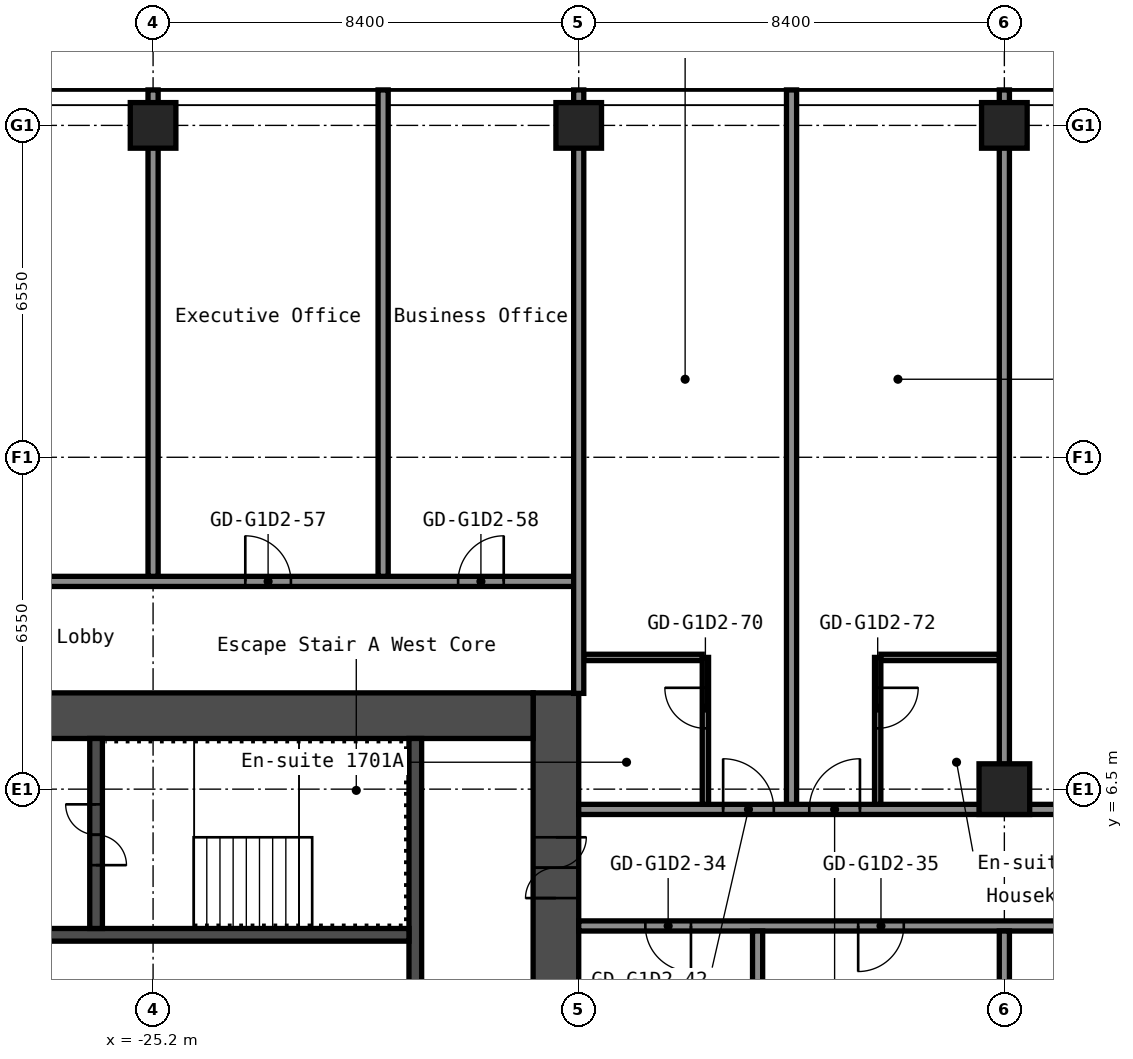
"""IFC4 building model, lengths in metres.
Left out: names, types, materials, properties, quantities, classifications, styles, units other than length and angle.
Written with IfcOpenShell. Run it as: python <this file> out.ifc"""

import sys

from ifc_helpers import new_model, si_unit, direction, frame, frame_2d, origin, origin_2d, place, context, subcontext, project, spatial, rectangle, hollow_rectangle, extrude, element, fill, save


model = new_model("IFC4")
c1 = context("Model", 3, precision=1e-05, world=origin(), true_north=direction((0.0, 1.0)))
c2 = subcontext(c1, "Body", "Model", "MODEL_VIEW")
j1 = project(units=[si_unit("LENGTHUNIT", "METRE"), si_unit("PLANEANGLEUNIT", "RADIAN")], contexts=[c1])
p1 = place(None, origin())
s1 = spatial("IfcSite", under=j1, at=p1, CompositionType="ELEMENT")
p2 = place(p1, origin())
s2 = spatial("IfcBuilding", under=s1, at=p2, CompositionType="ELEMENT")
p3 = place(p2, frame((0.0, 0.0, 61.4)))
s3 = spatial("IfcBuildingStorey", under=s2, at=p3, CompositionType="ELEMENT", Elevation=61.4)
for number, where, z_axis, x_axis in (
    (1, (-25.2, 19.6, 0.0), (0.0, 0.0, 1.0), (1.0, 0.0, 0.0)),
    (2, (-16.8, 19.6, 0.0), (0.0, 0.0, 1.0), (1.0, 0.0, 0.0)),
):
    element("IfcColumn", number, at=place(p3, frame(where, z_axis=z_axis, x_axis=x_axis)), inside=s3, PredefinedType="COLUMN", context=c2, shape_type="SweptSolid", body=[
        extrude(hollow_rectangle(XDim=0.9, YDim=0.9, WallThickness=0.036, at=origin_2d()), origin(), (0.0, 0.0, 1.0), 2.9),
    ])
p4 = place(p3, frame((-8.4, 6.5, 0.0), z_axis=(0.0, 0.0, 1.0), x_axis=(1.0, 0.0, 0.0)))
e3 = element("IfcColumn", 3, at=p4, inside=s3, PredefinedType="COLUMN", context=c2, shape_type="SweptSolid", body=[
    extrude(hollow_rectangle(XDim=1.0, YDim=1.0, WallThickness=0.04, at=origin_2d()), origin(), (0.0, 0.0, 1.0), 2.9),
])
p5 = place(p3, frame((-8.4, 19.6, 0.0), z_axis=(0.0, 0.0, 1.0), x_axis=(1.0, 0.0, 0.0)))
e4 = element("IfcColumn", 4, at=p5, inside=s3, PredefinedType="COLUMN", context=c2, shape_type="SweptSolid", body=[
    extrude(hollow_rectangle(XDim=0.9, YDim=0.9, WallThickness=0.036, at=origin_2d()), origin(), (0.0, 0.0, 1.0), 2.9),
])
p6 = place(p3, frame((-17.25, -8.4, 0.0), z_axis=(0.0, 0.0, 1.0), x_axis=(0.0, 1.0, 0.0)))
e5 = element("IfcWall", 5, at=p6, inside=s3, PredefinedType="SHEAR", context=c2, shape_type="SweptSolid", body=[
    extrude(rectangle(XDim=16.8, YDim=0.9, at=frame_2d((8.4, 0.0))), origin(), (0.0, 0.0, 1.0), 2.9),
])
p7 = place(p6, frame((12.75, 0.0, 0.0)))
e6 = element("IfcOpeningElement", 6, at=p7, cuts=e5, PredefinedType="OPENING", context=c2, shape_type="SweptSolid", body=[
    extrude(rectangle(XDim=1.2, YDim=2.1, at=frame_2d((0.6, 1.05))), frame((0.0, 0.46, 0.0), z_axis=(0.0, -1.0, 0.0), x_axis=(1.0, 0.0, 0.0)), (0.0, 0.0, 1.0), 0.92),
])
p8 = place(p6, frame((2.85, 0.0, 0.0)))
e7 = element("IfcOpeningElement", 7, at=p8, cuts=e5, PredefinedType="OPENING", context=c2, shape_type="SweptSolid", body=[
    extrude(rectangle(XDim=1.2, YDim=2.1, at=frame_2d((0.6, 1.05))), frame((0.0, 0.46, 0.0), z_axis=(0.0, -1.0, 0.0), x_axis=(1.0, 0.0, 0.0)), (0.0, 0.0, 1.0), 0.92),
])
p9 = place(p3, frame((-32.7, 7.95, 0.0), z_axis=(0.0, 0.0, 1.0), x_axis=(1.0, 0.0, 0.0)))
e8 = element("IfcWall", 8, at=p9, inside=s3, PredefinedType="SHEAR", context=c2, shape_type="SweptSolid", body=[
    extrude(rectangle(XDim=15.0, YDim=0.9, at=frame_2d((7.5, 0.0))), origin(), (0.0, 0.0, 1.0), 2.9),
])
p10 = place(p9, frame((3.4, 0.0, 0.0)))
e9 = element("IfcOpeningElement", 9, at=p10, cuts=e8, PredefinedType="OPENING", context=c2, shape_type="SweptSolid", body=[
    extrude(rectangle(XDim=1.2, YDim=2.1, at=frame_2d((0.6, 1.05))), frame((0.0, 0.46, 0.0), z_axis=(0.0, -1.0, 0.0), x_axis=(1.0, 0.0, 0.0)), (0.0, 0.0, 1.0), 0.92),
])
p11 = place(p9, frame((0.75, 0.0, 0.0)))
e10 = element("IfcOpeningElement", 10, at=p11, cuts=e8, PredefinedType="OPENING", context=c2, shape_type="SweptSolid", body=[
    extrude(rectangle(XDim=0.9, YDim=2.1, at=frame_2d((0.45, 1.05))), frame((0.0, 0.46, 0.0), z_axis=(0.0, -1.0, 0.0), x_axis=(1.0, 0.0, 0.0)), (0.0, 0.0, 1.0), 0.92),
])
p12 = place(p3, frame((-20.025, 1.2, 0.0), z_axis=(0.0, 0.0, 1.0), x_axis=(0.0, 1.0, 0.0)))
e11 = element("IfcWall", 11, at=p12, inside=s3, PredefinedType="SHEAR", context=c2, shape_type="SweptSolid", body=[
    extrude(rectangle(XDim=6.3, YDim=0.25, at=frame_2d((3.15, 0.0))), origin(), (0.0, 0.0, 1.0), 2.9),
])
p13 = place(p3, frame((-27.65, 3.625, 0.0), z_axis=(0.0, 0.0, 1.0), x_axis=(1.0, 0.0, 0.0)))
e12 = element("IfcWall", 12, at=p13, inside=s3, PredefinedType="SHEAR", context=c2, shape_type="SweptSolid", body=[
    extrude(rectangle(XDim=7.5, YDim=0.25, at=frame_2d((3.75, 0.0))), origin(), (0.0, 0.0, 1.0), 2.9),
])
p14 = place(p3, frame((-26.325, 3.75, 0.0), z_axis=(0.0, 0.0, 1.0), x_axis=(0.0, 1.0, 0.0)))
e13 = element("IfcWall", 13, at=p14, inside=s3, PredefinedType="SHEAR", context=c2, shape_type="SweptSolid", body=[
    extrude(rectangle(XDim=3.75, YDim=0.25, at=frame_2d((1.875, 0.0))), origin(), (0.0, 0.0, 1.0), 2.9),
])
p15 = place(p14, frame((1.25, 0.0, 0.0)))
e14 = element("IfcOpeningElement", 14, at=p15, cuts=e13, PredefinedType="OPENING", context=c2, shape_type="SweptSolid", body=[
    extrude(rectangle(XDim=1.2, YDim=2.1, at=frame_2d((0.6, 1.05))), frame((0.0, 0.135, 0.0), z_axis=(0.0, -1.0, 0.0), x_axis=(1.0, 0.0, 0.0)), (0.0, 0.0, 1.0), 0.27),
])
p16 = place(p3, frame((-16.8, 3.8, 0.0), z_axis=(0.0, 0.0, 1.0), x_axis=(1.0, 0.0, 0.0)))
e15 = element("IfcWall", 15, at=p16, inside=s3, PredefinedType="PARTITIONING", context=c2, shape_type="SweptSolid", body=[
    extrude(rectangle(XDim=33.6, YDim=0.2, at=frame_2d((16.8, 0.0))), origin(), (0.0, 0.0, 1.0), 2.9),
])
p17 = place(p16, frame((1.315, 0.0, 0.0)))
e16 = element("IfcOpeningElement", 16, at=p17, cuts=e15, PredefinedType="OPENING", context=c2, shape_type="SweptSolid", body=[
    extrude(rectangle(XDim=0.9, YDim=2.1, at=frame_2d((0.45, 1.05))), frame((0.0, 0.11, 0.0), z_axis=(0.0, -1.0, 0.0), x_axis=(1.0, 0.0, 0.0)), (0.0, 0.0, 1.0), 0.22),
])
p18 = place(p16, frame((5.515, 0.0, 0.0)))
e17 = element("IfcOpeningElement", 17, at=p18, cuts=e15, PredefinedType="OPENING", context=c2, shape_type="SweptSolid", body=[
    extrude(rectangle(XDim=0.9, YDim=2.1, at=frame_2d((0.45, 1.05))), frame((0.0, 0.11, 0.0), z_axis=(0.0, -1.0, 0.0), x_axis=(1.0, 0.0, 0.0)), (0.0, 0.0, 1.0), 0.22),
])
p19 = place(p16, frame((18.03, 0.0, 0.0)))
e18 = element("IfcOpeningElement", 18, at=p19, cuts=e15, PredefinedType="OPENING", context=c2, shape_type="SweptSolid", body=[
    extrude(rectangle(XDim=0.9, YDim=2.1, at=frame_2d((0.45, 1.05))), frame((0.0, 0.11, 0.0), z_axis=(0.0, -1.0, 0.0), x_axis=(1.0, 0.0, 0.0)), (0.0, 0.0, 1.0), 0.22),
])
p20 = place(p16, frame((22.23, 0.0, 0.0)))
e19 = element("IfcOpeningElement", 19, at=p20, cuts=e15, PredefinedType="OPENING", context=c2, shape_type="SweptSolid", body=[
    extrude(rectangle(XDim=0.9, YDim=2.1, at=frame_2d((0.45, 1.05))), frame((0.0, 0.11, 0.0), z_axis=(0.0, -1.0, 0.0), x_axis=(1.0, 0.0, 0.0)), (0.0, 0.0, 1.0), 0.22),
])
p21 = place(p3, frame((-16.8, 6.1, 0.0), z_axis=(0.0, 0.0, 1.0), x_axis=(1.0, 0.0, 0.0)))
e20 = element("IfcWall", 20, at=p21, inside=s3, PredefinedType="PARTITIONING", context=c2, shape_type="SweptSolid", body=[
    extrude(rectangle(XDim=33.6, YDim=0.2, at=frame_2d((16.8, 0.0))), origin(), (0.0, 0.0, 1.0), 2.9),
])
p22 = place(p21, frame((2.85, 0.0, 0.0)))
e21 = element("IfcOpeningElement", 21, at=p22, cuts=e20, PredefinedType="OPENING", context=c2, shape_type="SweptSolid", body=[
    extrude(rectangle(XDim=1.0, YDim=2.1, at=frame_2d((0.5, 1.05))), frame((0.0, 0.11, 0.0), z_axis=(0.0, -1.0, 0.0), x_axis=(1.0, 0.0, 0.0)), (0.0, 0.0, 1.0), 0.22),
])
p23 = place(p21, frame((4.55, 0.0, 0.0)))
e22 = element("IfcOpeningElement", 22, at=p23, cuts=e20, PredefinedType="OPENING", context=c2, shape_type="SweptSolid", body=[
    extrude(rectangle(XDim=1.0, YDim=2.1, at=frame_2d((0.5, 1.05))), frame((0.0, 0.11, 0.0), z_axis=(0.0, -1.0, 0.0), x_axis=(1.0, 0.0, 0.0)), (0.0, 0.0, 1.0), 0.22),
])
p24 = place(p21, frame((10.4, 0.0, 0.0)))
e23 = element("IfcOpeningElement", 23, at=p24, cuts=e20, PredefinedType="OPENING", context=c2, shape_type="SweptSolid", body=[
    extrude(rectangle(XDim=1.0, YDim=2.1, at=frame_2d((0.5, 1.05))), frame((0.0, 0.11, 0.0), z_axis=(0.0, -1.0, 0.0), x_axis=(1.0, 0.0, 0.0)), (0.0, 0.0, 1.0), 0.22),
])
p25 = place(p21, frame((22.3, 0.0, 0.0)))
e24 = element("IfcOpeningElement", 24, at=p25, cuts=e20, PredefinedType="OPENING", context=c2, shape_type="SweptSolid", body=[
    extrude(rectangle(XDim=1.0, YDim=2.1, at=frame_2d((0.5, 1.05))), frame((0.0, 0.11, 0.0), z_axis=(0.0, -1.0, 0.0), x_axis=(1.0, 0.0, 0.0)), (0.0, 0.0, 1.0), 0.22),
])
p26 = place(p21, frame((30.6, 0.0, 0.0)))
e25 = element("IfcOpeningElement", 25, at=p26, cuts=e20, PredefinedType="OPENING", context=c2, shape_type="SweptSolid", body=[
    extrude(rectangle(XDim=1.0, YDim=2.1, at=frame_2d((0.5, 1.05))), frame((0.0, 0.11, 0.0), z_axis=(0.0, -1.0, 0.0), x_axis=(1.0, 0.0, 0.0)), (0.0, 0.0, 1.0), 0.22),
])
for number, where, z_axis, x_axis in (
    (26, (-16.7, 9.1, 0.0), (0.0, 0.0, 1.0), (1.0, 0.0, 0.0)),
    (27, (-10.837, 9.1, 0.0), (0.0, 0.0, 1.0), (1.0, 0.0, 0.0)),
):
    element("IfcWall", number, at=place(p3, frame(where, z_axis=z_axis, x_axis=x_axis)), inside=s3, PredefinedType="PARTITIONING", context=c2, shape_type="SweptSolid", body=[
        extrude(rectangle(XDim=2.337, YDim=0.125, at=frame_2d((1.169, 0.0))), origin(), (0.0, 0.0, 1.0), 2.9),
    ])
p27 = place(p3, frame((-51.1, 10.6, 0.0), z_axis=(0.0, 0.0, 1.0), x_axis=(1.0, 0.0, 0.0)))
e28 = element("IfcWall", 28, at=p27, inside=s3, PredefinedType="PARTITIONING", context=c2, shape_type="SweptSolid", body=[
    extrude(rectangle(XDim=34.3, YDim=0.2, at=frame_2d((17.15, 0.0))), origin(), (0.0, 0.0, 1.0), 2.9),
])
p28 = place(p27, frame((4.2, 0.0, 0.0)))
e29 = element("IfcOpeningElement", 29, at=p28, cuts=e28, PredefinedType="OPENING", context=c2, shape_type="SweptSolid", body=[
    extrude(rectangle(XDim=1.0, YDim=2.1, at=frame_2d((0.5, 1.05))), frame((0.0, 0.11, 0.0), z_axis=(0.0, -1.0, 0.0), x_axis=(1.0, 0.0, 0.0)), (0.0, 0.0, 1.0), 0.22),
])
p29 = place(p27, frame((10.16, 0.0, 0.0)))
e30 = element("IfcOpeningElement", 30, at=p29, cuts=e28, PredefinedType="OPENING", context=c2, shape_type="SweptSolid", body=[
    extrude(rectangle(XDim=0.9, YDim=2.1, at=frame_2d((0.45, 1.05))), frame((0.0, 0.11, 0.0), z_axis=(0.0, -1.0, 0.0), x_axis=(1.0, 0.0, 0.0)), (0.0, 0.0, 1.0), 0.22),
])
p30 = place(p27, frame((14.36, 0.0, 0.0)))
e31 = element("IfcOpeningElement", 31, at=p30, cuts=e28, PredefinedType="OPENING", context=c2, shape_type="SweptSolid", body=[
    extrude(rectangle(XDim=0.9, YDim=2.1, at=frame_2d((0.45, 1.05))), frame((0.0, 0.11, 0.0), z_axis=(0.0, -1.0, 0.0), x_axis=(1.0, 0.0, 0.0)), (0.0, 0.0, 1.0), 0.22),
])
p31 = place(p27, frame((21.2, 0.0, 0.0)))
e32 = element("IfcOpeningElement", 32, at=p31, cuts=e28, PredefinedType="OPENING", context=c2, shape_type="SweptSolid", body=[
    extrude(rectangle(XDim=1.0, YDim=2.1, at=frame_2d((0.5, 1.05))), frame((0.0, 0.11, 0.0), z_axis=(0.0, -1.0, 0.0), x_axis=(1.0, 0.0, 0.0)), (0.0, 0.0, 1.0), 0.22),
])
p32 = place(p27, frame((27.72, 0.0, 0.0)))
e33 = element("IfcOpeningElement", 33, at=p32, cuts=e28, PredefinedType="OPENING", context=c2, shape_type="SweptSolid", body=[
    extrude(rectangle(XDim=0.9, YDim=2.1, at=frame_2d((0.45, 1.05))), frame((0.0, 0.11, 0.0), z_axis=(0.0, -1.0, 0.0), x_axis=(1.0, 0.0, 0.0)), (0.0, 0.0, 1.0), 0.22),
])
p33 = place(p27, frame((31.92, 0.0, 0.0)))
e34 = element("IfcOpeningElement", 34, at=p33, cuts=e28, PredefinedType="OPENING", context=c2, shape_type="SweptSolid", body=[
    extrude(rectangle(XDim=0.9, YDim=2.1, at=frame_2d((0.45, 1.05))), frame((0.0, 0.11, 0.0), z_axis=(0.0, -1.0, 0.0), x_axis=(1.0, 0.0, 0.0)), (0.0, 0.0, 1.0), 0.22),
])
for number, where, z_axis, x_axis in (
    (35, (-25.2, 10.7, 0.0), (0.0, 0.0, 1.0), (0.0, 1.0, 0.0)),
    (36, (-20.66, 10.7, 0.0), (0.0, 0.0, 1.0), (0.0, 1.0, 0.0)),
):
    element("IfcWall", number, at=place(p3, frame(where, z_axis=z_axis, x_axis=x_axis)), inside=s3, PredefinedType="PARTITIONING", context=c2, shape_type="SweptSolid", body=[
        extrude(rectangle(XDim=9.6, YDim=0.2, at=frame_2d((4.8, 0.0))), origin(), (0.0, 0.0, 1.0), 2.9),
    ])
p34 = place(p3, frame((-16.8, 8.39, 0.0), z_axis=(0.0, 0.0, 1.0), x_axis=(0.0, 1.0, 0.0)))
e37 = element("IfcWall", 37, at=p34, inside=s3, PredefinedType="PARTITIONING", context=c2, shape_type="SweptSolid", body=[
    extrude(rectangle(XDim=11.91, YDim=0.2, at=frame_2d((5.955, 0.0))), origin(), (0.0, 0.0, 1.0), 2.9),
])
p35 = place(p3, frame((-14.3, 6.2, 0.0), z_axis=(0.0, 0.0, 1.0), x_axis=(0.0, 1.0, 0.0)))
e38 = element("IfcWall", 38, at=p35, inside=s3, PredefinedType="PARTITIONING", context=c2, shape_type="SweptSolid", body=[
    extrude(rectangle(XDim=2.9, YDim=0.125, at=frame_2d((1.45, 0.0))), origin(), (0.0, 0.0, 1.0), 2.9),
])
p36 = place(p35, frame((1.5, 0.0, 0.0)))
e39 = element("IfcOpeningElement", 39, at=p36, cuts=e38, PredefinedType="OPENING", context=c2, shape_type="SweptSolid", body=[
    extrude(rectangle(XDim=0.8, YDim=2.1, at=frame_2d((0.4, 1.05))), frame((0.0, 0.073, 0.0), z_axis=(0.0, -1.0, 0.0), x_axis=(1.0, 0.0, 0.0)), (0.0, 0.0, 1.0), 0.145),
])
p37 = place(p3, frame((-13.27, -3.7, 0.0), z_axis=(0.0, 0.0, 1.0), x_axis=(0.0, 1.0, 0.0)))
e40 = element("IfcWall", 40, at=p37, inside=s3, PredefinedType="PARTITIONING", context=c2, shape_type="SweptSolid", body=[
    extrude(rectangle(XDim=7.4, YDim=0.2, at=frame_2d((3.7, 0.0))), origin(), (0.0, 0.0, 1.0), 2.9),
])
p38 = place(p3, frame((-12.6, 6.2, 0.0), z_axis=(0.0, 0.0, 1.0), x_axis=(0.0, 1.0, 0.0)))
e41 = element("IfcWall", 41, at=p38, inside=s3, PredefinedType="PARTITIONING", context=c2, shape_type="SweptSolid", body=[
    extrude(rectangle(XDim=14.1, YDim=0.2, at=frame_2d((7.05, 0.0))), origin(), (0.0, 0.0, 1.0), 2.9),
])
p39 = place(p3, frame((-10.9, 6.2, 0.0), z_axis=(0.0, 0.0, 1.0), x_axis=(0.0, 1.0, 0.0)))
e42 = element("IfcWall", 42, at=p39, inside=s3, PredefinedType="PARTITIONING", context=c2, shape_type="SweptSolid", body=[
    extrude(rectangle(XDim=2.9, YDim=0.125, at=frame_2d((1.45, 0.0))), origin(), (0.0, 0.0, 1.0), 2.9),
])
p40 = place(p39, frame((1.5, 0.0, 0.0)))
e43 = element("IfcOpeningElement", 43, at=p40, cuts=e42, PredefinedType="OPENING", context=c2, shape_type="SweptSolid", body=[
    extrude(rectangle(XDim=0.8, YDim=2.1, at=frame_2d((0.4, 1.05))), frame((0.0, 0.073, 0.0), z_axis=(0.0, -1.0, 0.0), x_axis=(1.0, 0.0, 0.0)), (0.0, 0.0, 1.0), 0.145),
])
p41 = place(p3, frame((-8.4, -3.7, 0.0), z_axis=(0.0, 0.0, 1.0), x_axis=(0.0, 1.0, 0.0)))
e44 = element("IfcWall", 44, at=p41, inside=s3, PredefinedType="PARTITIONING", context=c2, shape_type="SweptSolid", body=[
    extrude(rectangle(XDim=7.4, YDim=0.2, at=frame_2d((3.7, 0.0))), origin(), (0.0, 0.0, 1.0), 2.9),
])
p42 = place(p3, frame((-8.4, 6.99, 0.0), z_axis=(0.0, 0.0, 1.0), x_axis=(0.0, 1.0, 0.0)))
e45 = element("IfcWall", 45, at=p42, inside=s3, PredefinedType="PARTITIONING", context=c2, shape_type="SweptSolid", body=[
    extrude(rectangle(XDim=13.31, YDim=0.2, at=frame_2d((6.655, 0.0))), origin(), (0.0, 0.0, 1.0), 2.9),
])
p43 = place(p7, origin())
e46 = element("IfcDoor", 46, at=p43, inside=s3, OperationType="DOUBLE_DOOR_SINGLE_SWING", PredefinedType="DOOR", context=c2, shape_type="SweptSolid", body=[
    extrude(rectangle(XDim=1.2, YDim=2.1, at=frame_2d((0.6, 1.05))), frame((0.0, 0.025, 0.0), z_axis=(0.0, -1.0, 0.0), x_axis=(1.0, 0.0, 0.0)), (0.0, 0.0, 1.0), 0.05),
])
fill(e6, e46)
p44 = place(p15, origin())
e47 = element("IfcDoor", 47, at=p44, inside=s3, OperationType="DOUBLE_DOOR_SINGLE_SWING", PredefinedType="DOOR", context=c2, shape_type="SweptSolid", body=[
    extrude(rectangle(XDim=1.2, YDim=2.1, at=frame_2d((0.6, 1.05))), frame((0.0, 0.025, 0.0), z_axis=(0.0, -1.0, 0.0), x_axis=(1.0, 0.0, 0.0)), (0.0, 0.0, 1.0), 0.05),
])
fill(e14, e47)
p45 = place(p17, origin())
e48 = element("IfcDoor", 48, at=p45, inside=s3, OperationType="SINGLE_SWING_RIGHT", PredefinedType="DOOR", context=c2, shape_type="SweptSolid", body=[
    extrude(rectangle(XDim=0.9, YDim=2.1, at=frame_2d((0.45, 1.05))), frame((0.0, 0.025, 0.0), z_axis=(0.0, -1.0, 0.0), x_axis=(1.0, 0.0, 0.0)), (0.0, 0.0, 1.0), 0.05),
])
fill(e16, e48)
p46 = place(p18, origin())
e49 = element("IfcDoor", 49, at=p46, inside=s3, OperationType="SINGLE_SWING_LEFT", PredefinedType="DOOR", context=c2, shape_type="SweptSolid", body=[
    extrude(rectangle(XDim=0.9, YDim=2.1, at=frame_2d((0.45, 1.05))), frame((0.0, 0.025, 0.0), z_axis=(0.0, -1.0, 0.0), x_axis=(1.0, 0.0, 0.0)), (0.0, 0.0, 1.0), 0.05),
])
fill(e17, e49)
p47 = place(p22, origin())
e50 = element("IfcDoor", 50, at=p47, inside=s3, OperationType="SINGLE_SWING_RIGHT", PredefinedType="DOOR", context=c2, shape_type="SweptSolid", body=[
    extrude(rectangle(XDim=1.0, YDim=2.1, at=frame_2d((0.5, 1.05))), frame((0.0, 0.025, 0.0), z_axis=(0.0, -1.0, 0.0), x_axis=(1.0, 0.0, 0.0)), (0.0, 0.0, 1.0), 0.05),
])
fill(e21, e50)
p48 = place(p23, origin())
e51 = element("IfcDoor", 51, at=p48, inside=s3, OperationType="SINGLE_SWING_LEFT", PredefinedType="DOOR", context=c2, shape_type="SweptSolid", body=[
    extrude(rectangle(XDim=1.0, YDim=2.1, at=frame_2d((0.5, 1.05))), frame((0.0, 0.025, 0.0), z_axis=(0.0, -1.0, 0.0), x_axis=(1.0, 0.0, 0.0)), (0.0, 0.0, 1.0), 0.05),
])
fill(e22, e51)
p49 = place(p32, origin())
e52 = element("IfcDoor", 52, at=p49, inside=s3, OperationType="SINGLE_SWING_RIGHT", PredefinedType="DOOR", context=c2, shape_type="SweptSolid", body=[
    extrude(rectangle(XDim=0.9, YDim=2.1, at=frame_2d((0.45, 1.05))), frame((0.0, 0.025, 0.0), z_axis=(0.0, -1.0, 0.0), x_axis=(1.0, 0.0, 0.0)), (0.0, 0.0, 1.0), 0.05),
])
fill(e33, e52)
p50 = place(p33, origin())
e53 = element("IfcDoor", 53, at=p50, inside=s3, OperationType="SINGLE_SWING_LEFT", PredefinedType="DOOR", context=c2, shape_type="SweptSolid", body=[
    extrude(rectangle(XDim=0.9, YDim=2.1, at=frame_2d((0.45, 1.05))), frame((0.0, 0.025, 0.0), z_axis=(0.0, -1.0, 0.0), x_axis=(1.0, 0.0, 0.0)), (0.0, 0.0, 1.0), 0.05),
])
fill(e34, e53)
p51 = place(p36, origin())
e54 = element("IfcDoor", 54, at=p51, inside=s3, OperationType="SINGLE_SWING_LEFT", PredefinedType="DOOR", context=c2, shape_type="SweptSolid", body=[
    extrude(rectangle(XDim=0.8, YDim=2.1, at=frame_2d((0.4, 1.05))), frame((0.0, 0.025, 0.0), z_axis=(0.0, -1.0, 0.0), x_axis=(1.0, 0.0, 0.0)), (0.0, 0.0, 1.0), 0.05),
])
fill(e39, e54)
p52 = place(p40, origin())
e55 = element("IfcDoor", 55, at=p52, inside=s3, OperationType="SINGLE_SWING_RIGHT", PredefinedType="DOOR", context=c2, shape_type="SweptSolid", body=[
    extrude(rectangle(XDim=0.8, YDim=2.1, at=frame_2d((0.4, 1.05))), frame((0.0, 0.025, 0.0), z_axis=(0.0, -1.0, 0.0), x_axis=(1.0, 0.0, 0.0)), (0.0, 0.0, 1.0), 0.05),
])
fill(e43, e55)
save(model, sys.argv[1])
